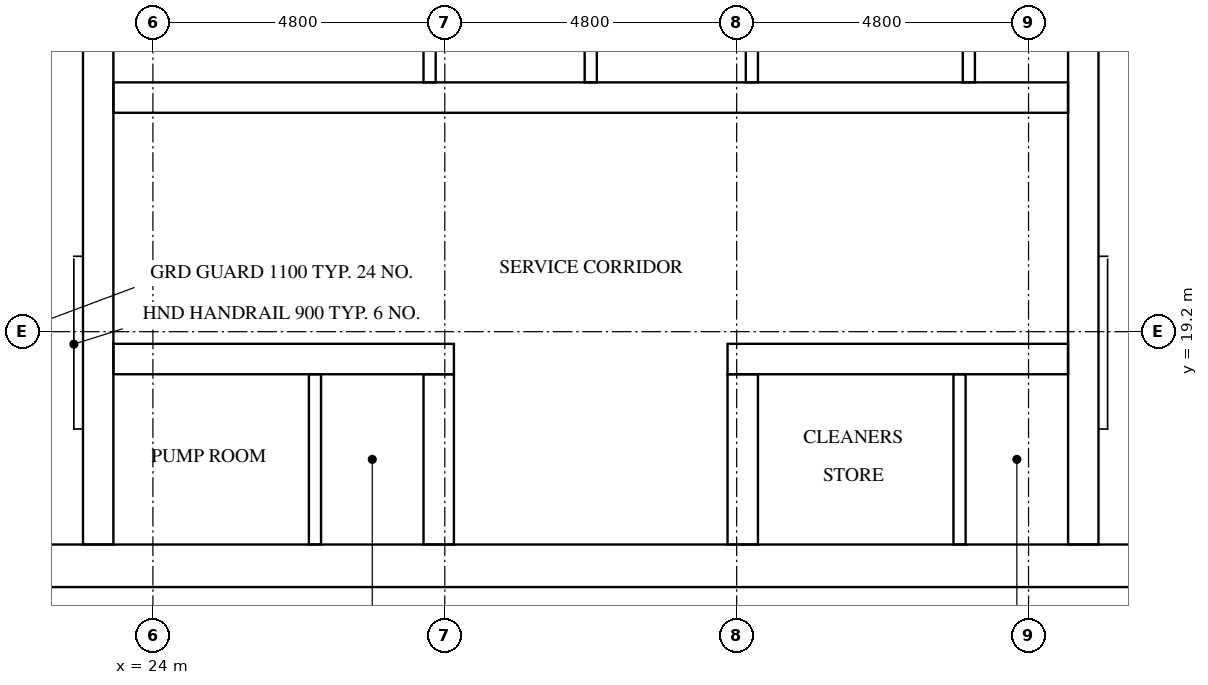
"""IFC4 building model, lengths in metres.
Left out: names, types, materials, properties, quantities, classifications, styles, units other than length and angle.
Written with IfcOpenShell. Run it as: python <this file> out.ifc"""

import sys

from ifc_helpers import new_model, si_unit, direction, frame, frame_2d, origin, place, context, subcontext, project, spatial, rectangle, extrude, element, fill, save


model = new_model("IFC4")
c1 = context("Model", 3, precision=1e-05, world=origin(), true_north=direction((0.0, 1.0)))
c2 = subcontext(c1, "Body", "Model", "MODEL_VIEW")
j1 = project(units=[si_unit("LENGTHUNIT", "METRE"), si_unit("PLANEANGLEUNIT", "RADIAN")], contexts=[c1])
p1 = place(None, origin())
s1 = spatial("IfcSite", under=j1, at=p1, CompositionType="ELEMENT")
p2 = place(p1, origin())
s2 = spatial("IfcBuilding", under=s1, at=p2, CompositionType="ELEMENT")
p3 = place(p2, frame((0.0, 0.0, 226.3)))
s3 = spatial("IfcBuildingStorey", under=s2, at=p3, CompositionType="ELEMENT", Elevation=226.3)
p4 = place(p3, frame((15.0, 15.35, 0.0), z_axis=(0.0, 0.0, 1.0), x_axis=(1.0, 0.0, 0.0)))
e1 = element("IfcWall", 1, at=p4, inside=s3, PredefinedType="SHEAR", context=c2, shape_type="SweptSolid", body=[
    extrude(rectangle(XDim=32.4, YDim=0.7, at=frame_2d((16.2, 0.0))), origin(), (0.0, 0.0, 1.0), 3.2),
])
p5 = place(p4, frame((15.3, 0.0, 0.0)))
e2 = element("IfcOpeningElement", 2, at=p5, cuts=e1, PredefinedType="OPENING", context=c2, shape_type="SweptSolid", body=[
    extrude(rectangle(XDim=1.8, YDim=2.1, at=frame_2d((0.9, 1.05))), frame((0.0, 0.36, 0.0), z_axis=(0.0, -1.0, 0.0), x_axis=(1.0, 0.0, 0.0)), (0.0, 0.0, 1.0), 0.72),
])
p6 = place(p3, frame((23.1, 15.7, 0.0), z_axis=(0.0, 0.0, 1.0), x_axis=(0.0, 1.0, 0.0)))
e3 = element("IfcWall", 3, at=p6, inside=s3, PredefinedType="SHEAR", context=c2, shape_type="SweptSolid", body=[
    extrude(rectangle(XDim=21.4, YDim=0.5, at=frame_2d((10.7, 0.0))), origin(), (0.0, 0.0, 1.0), 3.2),
])
p7 = place(p3, frame((39.3, 15.7, 0.0), z_axis=(0.0, 0.0, 1.0), x_axis=(0.0, 1.0, 0.0)))
e4 = element("IfcWall", 4, at=p7, inside=s3, PredefinedType="SHEAR", context=c2, shape_type="SweptSolid", body=[
    extrude(rectangle(XDim=8.55, YDim=0.5, at=frame_2d((4.275, 0.0))), origin(), (0.0, 0.0, 1.0), 3.2),
])
p8 = place(p3, frame((23.35, 18.75, 0.0), z_axis=(0.0, 0.0, 1.0), x_axis=(1.0, 0.0, 0.0)))
e5 = element("IfcWall", 5, at=p8, inside=s3, PredefinedType="SHEAR", context=c2, shape_type="SweptSolid", body=[
    extrude(rectangle(XDim=5.6, YDim=0.5, at=frame_2d((2.8, 0.0))), origin(), (0.0, 0.0, 1.0), 3.2),
])
p9 = place(p8, frame((1.107, 0.0, 0.0)))
e6 = element("IfcOpeningElement", 6, at=p9, cuts=e5, PredefinedType="OPENING", context=c2, shape_type="SweptSolid", body=[
    extrude(rectangle(XDim=1.0, YDim=2.1, at=frame_2d((0.5, 1.05))), frame((0.0, 0.26, 0.0), z_axis=(0.0, -1.0, 0.0), x_axis=(1.0, 0.0, 0.0)), (0.0, 0.0, 1.0), 0.52),
])
p10 = place(p8, frame((3.758, 0.0, 0.0)))
e7 = element("IfcOpeningElement", 7, at=p10, cuts=e5, PredefinedType="OPENING", context=c2, shape_type="SweptSolid", body=[
    extrude(rectangle(XDim=1.0, YDim=2.1, at=frame_2d((0.5, 1.05))), frame((0.0, 0.26, 0.0), z_axis=(0.0, -1.0, 0.0), x_axis=(1.0, 0.0, 0.0)), (0.0, 0.0, 1.0), 0.52),
])
p11 = place(p3, frame((33.45, 18.75, 0.0), z_axis=(0.0, 0.0, 1.0), x_axis=(1.0, 0.0, 0.0)))
e8 = element("IfcWall", 8, at=p11, inside=s3, PredefinedType="SHEAR", context=c2, shape_type="SweptSolid", body=[
    extrude(rectangle(XDim=5.6, YDim=0.5, at=frame_2d((2.8, 0.0))), origin(), (0.0, 0.0, 1.0), 3.2),
])
p12 = place(p11, frame((1.607, 0.0, 0.0)))
e9 = element("IfcOpeningElement", 9, at=p12, cuts=e8, PredefinedType="OPENING", context=c2, shape_type="SweptSolid", body=[
    extrude(rectangle(XDim=1.0, YDim=2.1, at=frame_2d((0.5, 1.05))), frame((0.0, 0.26, 0.0), z_axis=(0.0, -1.0, 0.0), x_axis=(1.0, 0.0, 0.0)), (0.0, 0.0, 1.0), 0.52),
])
p13 = place(p11, frame((4.258, 0.0, 0.0)))
e10 = element("IfcOpeningElement", 10, at=p13, cuts=e8, PredefinedType="OPENING", context=c2, shape_type="SweptSolid", body=[
    extrude(rectangle(XDim=1.0, YDim=2.1, at=frame_2d((0.5, 1.05))), frame((0.0, 0.26, 0.0), z_axis=(0.0, -1.0, 0.0), x_axis=(1.0, 0.0, 0.0)), (0.0, 0.0, 1.0), 0.52),
])
p14 = place(p3, frame((23.35, 23.05, 0.0), z_axis=(0.0, 0.0, 1.0), x_axis=(1.0, 0.0, 0.0)))
e11 = element("IfcWall", 11, at=p14, inside=s3, PredefinedType="SHEAR", context=c2, shape_type="SweptSolid", body=[
    extrude(rectangle(XDim=15.7, YDim=0.5, at=frame_2d((7.85, 0.0))), origin(), (0.0, 0.0, 1.0), 3.2),
])
p15 = place(p14, frame((2.05, 0.0, 0.0)))
e12 = element("IfcOpeningElement", 12, at=p15, cuts=e11, PredefinedType="OPENING", context=c2, shape_type="SweptSolid", body=[
    extrude(rectangle(XDim=1.0, YDim=2.1, at=frame_2d((0.5, 1.05))), frame((0.0, 0.26, 0.0), z_axis=(0.0, -1.0, 0.0), x_axis=(1.0, 0.0, 0.0)), (0.0, 0.0, 1.0), 0.52),
])
p16 = place(p14, frame((11.784, 0.0, 0.0)))
e13 = element("IfcOpeningElement", 13, at=p16, cuts=e11, PredefinedType="OPENING", context=c2, shape_type="SweptSolid", body=[
    extrude(rectangle(XDim=1.0, YDim=2.1, at=frame_2d((0.5, 1.05))), frame((0.0, 0.26, 0.0), z_axis=(0.0, -1.0, 0.0), x_axis=(1.0, 0.0, 0.0)), (0.0, 0.0, 1.0), 0.52),
])
p17 = place(p14, frame((14.434, 0.0, 0.0)))
e14 = element("IfcOpeningElement", 14, at=p17, cuts=e11, PredefinedType="OPENING", context=c2, shape_type="SweptSolid", body=[
    extrude(rectangle(XDim=1.0, YDim=2.1, at=frame_2d((0.5, 1.05))), frame((0.0, 0.26, 0.0), z_axis=(0.0, -1.0, 0.0), x_axis=(1.0, 0.0, 0.0)), (0.0, 0.0, 1.0), 0.52),
])
for number, where, z_axis, x_axis in (
    (15, (28.7, 15.7, 0.0), (0.0, 0.0, 1.0), (0.0, 1.0, 0.0)),
    (16, (33.7, 15.7, 0.0), (0.0, 0.0, 1.0), (0.0, 1.0, 0.0)),
):
    element("IfcWall", number, at=place(p3, frame(where, z_axis=z_axis, x_axis=x_axis)), inside=s3, PredefinedType="SHEAR", context=c2, shape_type="SweptSolid", body=[
        extrude(rectangle(XDim=2.8, YDim=0.5, at=frame_2d((1.4, 0.0))), origin(), (0.0, 0.0, 1.0), 3.2),
    ])
for number, where, z_axis, x_axis in (
    (17, (28.55, 23.3, 0.0), (0.0, 0.0, 1.0), (0.0, 1.0, 0.0)),
    (18, (31.2, 23.3, 0.0), (0.0, 0.0, 1.0), (0.0, 1.0, 0.0)),
    (19, (33.85, 23.3, 0.0), (0.0, 0.0, 1.0), (0.0, 1.0, 0.0)),
):
    element("IfcWall", number, at=place(p3, frame(where, z_axis=z_axis, x_axis=x_axis)), inside=s3, PredefinedType="SOLIDWALL", context=c2, shape_type="SweptSolid", body=[
        extrude(rectangle(XDim=2.6, YDim=0.2, at=frame_2d((1.3, 0.0))), origin(), (0.0, 0.0, 1.0), 3.2),
    ])
p18 = place(p3, frame((37.418, 23.3, 0.0), z_axis=(0.0, 0.0, 1.0), x_axis=(0.0, 1.0, 0.0)))
e20 = element("IfcWall", 20, at=p18, inside=s3, PredefinedType="PARTITIONING", context=c2, shape_type="SweptSolid", body=[
    extrude(rectangle(XDim=2.6, YDim=0.2, at=frame_2d((1.3, 0.0))), origin(), (0.0, 0.0, 1.0), 3.2),
])
for number, where, z_axis, x_axis in (
    (21, (26.665, 15.7, 0.0), (0.0, 0.0, 1.0), (0.0, 1.0, 0.0)),
    (22, (37.265, 15.7, 0.0), (0.0, 0.0, 1.0), (0.0, 1.0, 0.0)),
):
    element("IfcWall", number, at=place(p3, frame(where, z_axis=z_axis, x_axis=x_axis)), inside=s3, PredefinedType="PARTITIONING", context=c2, shape_type="SweptSolid", body=[
        extrude(rectangle(XDim=2.8, YDim=0.2, at=frame_2d((1.4, 0.0))), origin(), (0.0, 0.0, 1.0), 3.2),
    ])
p19 = place(p5, frame((1.8, 0.0, 0.0), z_axis=(0.0, 0.0, 1.0), x_axis=(-1.0, 0.0, 0.0)))
e23 = element("IfcDoor", 23, at=p19, inside=s3, OperationType="DOUBLE_DOOR_SINGLE_SWING", PredefinedType="DOOR", context=c2, shape_type="SweptSolid", body=[
    extrude(rectangle(XDim=1.8, YDim=2.1, at=frame_2d((0.9, 1.05))), frame((0.0, 0.025, 0.0), z_axis=(0.0, -1.0, 0.0), x_axis=(1.0, 0.0, 0.0)), (0.0, 0.0, 1.0), 0.05),
])
fill(e2, e23)
p20 = place(p15, frame((1.0, 0.0, 0.0), z_axis=(0.0, 0.0, 1.0), x_axis=(-1.0, 0.0, 0.0)))
e24 = element("IfcDoor", 24, at=p20, inside=s3, OperationType="SINGLE_SWING_RIGHT", PredefinedType="DOOR", context=c2, shape_type="SweptSolid", body=[
    extrude(rectangle(XDim=1.0, YDim=2.1, at=frame_2d((0.5, 1.05))), frame((0.0, 0.025, 0.0), z_axis=(0.0, -1.0, 0.0), x_axis=(1.0, 0.0, 0.0)), (0.0, 0.0, 1.0), 0.05),
])
fill(e12, e24)
p21 = place(p16, frame((1.0, 0.0, 0.0), z_axis=(0.0, 0.0, 1.0), x_axis=(-1.0, 0.0, 0.0)))
e25 = element("IfcDoor", 25, at=p21, inside=s3, OperationType="SINGLE_SWING_LEFT", PredefinedType="DOOR", context=c2, shape_type="SweptSolid", body=[
    extrude(rectangle(XDim=1.0, YDim=2.1, at=frame_2d((0.5, 1.05))), frame((0.0, 0.025, 0.0), z_axis=(0.0, -1.0, 0.0), x_axis=(1.0, 0.0, 0.0)), (0.0, 0.0, 1.0), 0.05),
])
fill(e13, e25)
p22 = place(p17, frame((1.0, 0.0, 0.0), z_axis=(0.0, 0.0, 1.0), x_axis=(-1.0, 0.0, 0.0)))
e26 = element("IfcDoor", 26, at=p22, inside=s3, OperationType="SINGLE_SWING_RIGHT", PredefinedType="DOOR", context=c2, shape_type="SweptSolid", body=[
    extrude(rectangle(XDim=1.0, YDim=2.1, at=frame_2d((0.5, 1.05))), frame((0.0, 0.025, 0.0), z_axis=(0.0, -1.0, 0.0), x_axis=(1.0, 0.0, 0.0)), (0.0, 0.0, 1.0), 0.05),
])
fill(e14, e26)
p23 = place(p9, origin())
e27 = element("IfcDoor", 27, at=p23, inside=s3, OperationType="SINGLE_SWING_LEFT", PredefinedType="DOOR", context=c2, shape_type="SweptSolid", body=[
    extrude(rectangle(XDim=1.0, YDim=2.1, at=frame_2d((0.5, 1.05))), frame((0.0, 0.025, 0.0), z_axis=(0.0, -1.0, 0.0), x_axis=(1.0, 0.0, 0.0)), (0.0, 0.0, 1.0), 0.05),
])
fill(e6, e27)
p24 = place(p10, origin())
e28 = element("IfcDoor", 28, at=p24, inside=s3, OperationType="SINGLE_SWING_RIGHT", PredefinedType="DOOR", context=c2, shape_type="SweptSolid", body=[
    extrude(rectangle(XDim=1.0, YDim=2.1, at=frame_2d((0.5, 1.05))), frame((0.0, 0.025, 0.0), z_axis=(0.0, -1.0, 0.0), x_axis=(1.0, 0.0, 0.0)), (0.0, 0.0, 1.0), 0.05),
])
fill(e7, e28)
p25 = place(p12, origin())
e29 = element("IfcDoor", 29, at=p25, inside=s3, OperationType="SINGLE_SWING_LEFT", PredefinedType="DOOR", context=c2, shape_type="SweptSolid", body=[
    extrude(rectangle(XDim=1.0, YDim=2.1, at=frame_2d((0.5, 1.05))), frame((0.0, 0.025, 0.0), z_axis=(0.0, -1.0, 0.0), x_axis=(1.0, 0.0, 0.0)), (0.0, 0.0, 1.0), 0.05),
])
fill(e9, e29)
p26 = place(p13, origin())
e30 = element("IfcDoor", 30, at=p26, inside=s3, OperationType="SINGLE_SWING_RIGHT", PredefinedType="DOOR", context=c2, shape_type="SweptSolid", body=[
    extrude(rectangle(XDim=1.0, YDim=2.1, at=frame_2d((0.5, 1.05))), frame((0.0, 0.025, 0.0), z_axis=(0.0, -1.0, 0.0), x_axis=(1.0, 0.0, 0.0)), (0.0, 0.0, 1.0), 0.05),
])
fill(e10, e30)
save(model, sys.argv[1])
